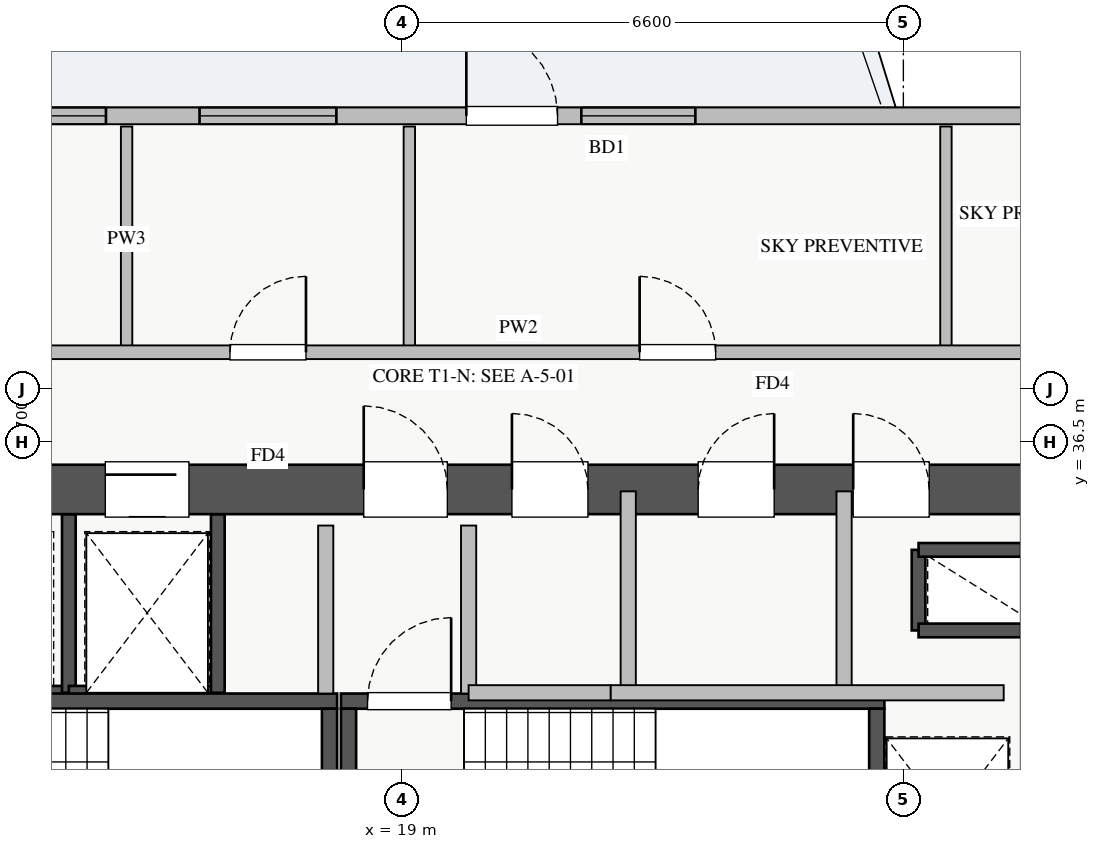
"""IFC4 building model, lengths in metres.
Left out: names, types, materials, properties, quantities, classifications, styles, units other than length and angle.
Written with IfcOpenShell. Run it as: python <this file> out.ifc"""

import sys

from ifc_helpers import new_model, si_unit, direction, frame, frame_2d, origin, place, context, subcontext, project, spatial, rectangle, extrude, source, transform, mapped, element, fill, save


model = new_model("IFC4")
c1 = context("Model", 3, precision=1e-05, world=origin(), true_north=direction((0.0, 1.0)))
c2 = subcontext(c1, "Body", "Model", "MODEL_VIEW")
j1 = project(units=[si_unit("LENGTHUNIT", "METRE"), si_unit("PLANEANGLEUNIT", "RADIAN")], contexts=[c1])
p1 = place(None, origin())
s1 = spatial("IfcSite", under=j1, at=p1, CompositionType="ELEMENT")
p2 = place(p1, origin())
s2 = spatial("IfcBuilding", under=s1, at=p2, CompositionType="ELEMENT")
p3 = place(p2, frame((0.0, 0.0, 179.5)))
s3 = spatial("IfcBuildingStorey", under=s2, at=p3, CompositionType="ELEMENT", Elevation=179.5)
p4 = place(p3, frame((12.68, 33.2, 0.0), z_axis=(0.0, 0.0, 1.0), x_axis=(1.0, 0.0, 0.0)))
e1 = element("IfcWall", 1, at=p4, inside=s3, PredefinedType="SHEAR", context=c2, shape_type="SweptSolid", body=[
    extrude(rectangle(XDim=1.94, YDim=0.18, at=frame_2d((0.97, 0.0))), origin(), (0.0, 0.0, 1.0), 3.07),
])
p5 = place(p3, frame((14.62, 33.2, 0.0), z_axis=(0.0, 0.0, 1.0), x_axis=(0.0, 1.0, 0.0)))
e2 = element("IfcWall", 2, at=p5, inside=s3, PredefinedType="SHEAR", context=c2, shape_type="SweptSolid", body=[
    extrude(rectangle(XDim=2.35, YDim=0.18, at=frame_2d((1.175, 0.0))), origin(), (0.0, 0.0, 1.0), 3.07),
])
p6 = place(p3, frame((25.8, 34.02, 0.0), z_axis=(0.0, 0.0, 1.0), x_axis=(0.0, 1.0, 0.0)))
e3 = element("IfcWall", 3, at=p6, inside=s3, PredefinedType="SHEAR", context=c2, shape_type="SweptSolid", body=[
    extrude(rectangle(XDim=1.06, YDim=0.18, at=frame_2d((0.53, 0.0))), origin(), (0.0, 0.0, 1.0), 3.07),
])
for number, where, z_axis, x_axis in (
    (4, (25.8, 35.08, 0.0), (0.0, 0.0, 1.0), (1.0, 0.0, 0.0)),
    (5, (25.8, 34.02, 0.0), (0.0, 0.0, 1.0), (1.0, 0.0, 0.0)),
):
    element("IfcWall", number, at=place(p3, frame(where, z_axis=z_axis, x_axis=x_axis)), inside=s3, PredefinedType="SHEAR", context=c2, shape_type="SweptSolid", body=[
        extrude(rectangle(XDim=1.35, YDim=0.18, at=frame_2d((0.675, 0.0))), origin(), (0.0, 0.0, 1.0), 3.07),
    ])
p7 = place(p3, frame((14.62, 33.2, 0.0), z_axis=(0.0, 0.0, 1.0), x_axis=(1.0, 0.0, 0.0)))
e6 = element("IfcWall", 6, at=p7, inside=s3, PredefinedType="SHEAR", context=c2, shape_type="SweptSolid", body=[
    extrude(rectangle(XDim=1.96, YDim=0.18, at=frame_2d((0.98, 0.0))), origin(), (0.0, 0.0, 1.0), 3.07),
])
p8 = place(p3, frame((16.58, 33.2, 0.0), z_axis=(0.0, 0.0, 1.0), x_axis=(0.0, 1.0, 0.0)))
e7 = element("IfcWall", 7, at=p8, inside=s3, PredefinedType="SHEAR", context=c2, shape_type="SweptSolid", body=[
    extrude(rectangle(XDim=2.35, YDim=0.18, at=frame_2d((1.175, 0.0))), origin(), (0.0, 0.0, 1.0), 3.07),
])
p9 = place(p3, frame((10.85, 33.09, 0.0), z_axis=(0.0, 0.0, 1.0), x_axis=(1.0, 0.0, 0.0)))
e8 = element("IfcWall", 8, at=p9, inside=s3, PredefinedType="SHEAR", context=c2, shape_type="SweptSolid", body=[
    extrude(rectangle(XDim=7.3, YDim=0.2, at=frame_2d((3.65, 0.0))), origin(), (0.0, 0.0, 1.0), 3.25),
])
p10 = place(p9, frame((0.35, 0.0, 0.0)))
e9 = element("IfcOpeningElement", 9, at=p10, cuts=e8, PredefinedType="OPENING", context=c2, shape_type="SweptSolid", body=[
    extrude(rectangle(XDim=1.1, YDim=2.05, at=frame_2d((0.55, 1.025))), frame((0.0, 0.11, 0.0), z_axis=(0.0, -1.0, 0.0), x_axis=(1.0, 0.0, 0.0)), (0.0, 0.0, 1.0), 0.22),
])
p11 = place(p3, frame((18.05, 30.05, 0.0), z_axis=(0.0, 0.0, 1.0), x_axis=(0.0, 1.0, 0.0)))
e10 = element("IfcWall", 10, at=p11, inside=s3, PredefinedType="SHEAR", context=c2, shape_type="SweptSolid", body=[
    extrude(rectangle(XDim=2.94, YDim=0.2, at=frame_2d((1.47, 0.0))), origin(), (0.0, 0.0, 1.0), 3.25),
])
p12 = place(p3, frame((18.2, 33.09, 0.0), z_axis=(0.0, 0.0, 1.0), x_axis=(1.0, 0.0, 0.0)))
e11 = element("IfcWall", 11, at=p12, inside=s3, PredefinedType="SHEAR", context=c2, shape_type="SweptSolid", body=[
    extrude(rectangle(XDim=7.15, YDim=0.2, at=frame_2d((3.575, 0.0))), origin(), (0.0, 0.0, 1.0), 3.25),
])
p13 = place(p12, frame((0.35, 0.0, 0.0)))
e12 = element("IfcOpeningElement", 12, at=p13, cuts=e11, PredefinedType="OPENING", context=c2, shape_type="SweptSolid", body=[
    extrude(rectangle(XDim=1.1, YDim=2.05, at=frame_2d((0.55, 1.025))), frame((0.0, 0.11, 0.0), z_axis=(0.0, -1.0, 0.0), x_axis=(1.0, 0.0, 0.0)), (0.0, 0.0, 1.0), 0.22),
])
for number, where, z_axis, x_axis in (
    (13, (18.3, 30.05, 0.0), (0.0, 0.0, 1.0), (0.0, 1.0, 0.0)),
    (14, (25.25, 30.05, 0.0), (0.0, 0.0, 1.0), (0.0, 1.0, 0.0)),
):
    element("IfcWall", number, at=place(p3, frame(where, z_axis=z_axis, x_axis=x_axis)), inside=s3, PredefinedType="SHEAR", context=c2, shape_type="SweptSolid", body=[
        extrude(rectangle(XDim=2.94, YDim=0.2, at=frame_2d((1.47, 0.0))), origin(), (0.0, 0.0, 1.0), 3.25),
    ])
p14 = place(p3, frame((10.2, 35.875, 0.0), z_axis=(0.0, 0.0, 1.0), x_axis=(1.0, 0.0, 0.0)))
e15 = element("IfcWall", 15, at=p14, inside=s3, PredefinedType="SHEAR", context=c2, shape_type="SweptSolid", body=[
    extrude(rectangle(XDim=17.6, YDim=0.65, at=frame_2d((8.8, 0.0))), origin(), (0.0, 0.0, 1.0), 3.25),
])
p15 = place(p14, frame((1.15, 0.0, 0.0)))
e16 = element("IfcOpeningElement", 16, at=p15, cuts=e15, PredefinedType="OPENING", context=c2, shape_type="SweptSolid", body=[
    extrude(rectangle(XDim=1.1, YDim=2.05, at=frame_2d((0.55, 1.025))), frame((0.0, 0.335, 0.0), z_axis=(0.0, -1.0, 0.0), x_axis=(1.0, 0.0, 0.0)), (0.0, 0.0, 1.0), 0.67),
])
p16 = place(p14, frame((8.3, 0.0, 0.0)))
e17 = element("IfcOpeningElement", 17, at=p16, cuts=e15, PredefinedType="OPENING", context=c2, shape_type="SweptSolid", body=[
    extrude(rectangle(XDim=1.1, YDim=2.05, at=frame_2d((0.55, 1.025))), frame((0.0, 0.335, 0.0), z_axis=(0.0, -1.0, 0.0), x_axis=(1.0, 0.0, 0.0)), (0.0, 0.0, 1.0), 0.67),
])
p17 = place(p14, frame((4.9, 0.0, 0.0)))
e18 = element("IfcOpeningElement", 18, at=p17, cuts=e15, PredefinedType="OPENING", context=c2, shape_type="SweptSolid", body=[
    extrude(rectangle(XDim=1.1, YDim=2.05, at=frame_2d((0.55, 1.025))), frame((0.0, 0.335, 0.0), z_axis=(0.0, -1.0, 0.0), x_axis=(1.0, 0.0, 0.0)), (0.0, 0.0, 1.0), 0.67),
])
p18 = place(p14, frame((14.74, 0.0, 0.0)))
e19 = element("IfcOpeningElement", 19, at=p18, cuts=e15, PredefinedType="OPENING", context=c2, shape_type="SweptSolid", body=[
    extrude(rectangle(XDim=1.0, YDim=2.05, at=frame_2d((0.5, 1.025))), frame((0.0, 0.335, 0.0), z_axis=(0.0, -1.0, 0.0), x_axis=(1.0, 0.0, 0.0)), (0.0, 0.0, 1.0), 0.67),
])
p19 = place(p14, frame((10.25, 0.0, 0.0)))
e20 = element("IfcOpeningElement", 20, at=p19, cuts=e15, PredefinedType="OPENING", context=c2, shape_type="SweptSolid", body=[
    extrude(rectangle(XDim=1.0, YDim=2.05, at=frame_2d((0.5, 1.025))), frame((0.0, 0.335, 0.0), z_axis=(0.0, -1.0, 0.0), x_axis=(1.0, 0.0, 0.0)), (0.0, 0.0, 1.0), 0.67),
])
p20 = place(p14, frame((12.7, 0.0, 0.0)))
e21 = element("IfcOpeningElement", 21, at=p20, cuts=e15, PredefinedType="OPENING", context=c2, shape_type="SweptSolid", body=[
    extrude(rectangle(XDim=1.0, YDim=2.05, at=frame_2d((0.5, 1.025))), frame((0.0, 0.335, 0.0), z_axis=(0.0, -1.0, 0.0), x_axis=(1.0, 0.0, 0.0)), (0.0, 0.0, 1.0), 0.67),
])
p21 = place(p3, frame((6.55, 40.79, 0.0), z_axis=(0.0, 0.0, 1.0), x_axis=(1.0, 0.0, 0.0)))
e22 = element("IfcWall", 22, at=p21, inside=s3, PredefinedType="STANDARD", context=c2, shape_type="SweptSolid", body=[
    extrude(rectangle(XDim=24.9, YDim=0.22, at=frame_2d((12.45, 0.0))), origin(), (0.0, 0.0, 1.0), 2.61),
])
p22 = place(p21, frame((13.3, 0.0, 0.0)))
e23 = element("IfcOpeningElement", 23, at=p22, cuts=e22, PredefinedType="OPENING", context=c2, shape_type="SweptSolid", body=[
    extrude(rectangle(XDim=1.2, YDim=2.1, at=frame_2d((0.6, 1.05))), frame((0.0, 0.12, 0.0), z_axis=(0.0, -1.0, 0.0), x_axis=(1.0, 0.0, 0.0)), (0.0, 0.0, 1.0), 0.24),
])
p23 = place(p21, frame((0.343, 0.0, 0.9)))
e24 = element("IfcOpeningElement", 24, at=p23, cuts=e22, PredefinedType="OPENING", context=c2, shape_type="SweptSolid", body=[
    extrude(rectangle(XDim=1.5, YDim=1.5, at=frame_2d((0.75, 0.75))), frame((0.0, 0.12, 0.0), z_axis=(0.0, -1.0, 0.0), x_axis=(1.0, 0.0, 0.0)), (0.0, 0.0, 1.0), 0.24),
])
p24 = place(p21, frame((9.79, 0.0, 0.9)))
e25 = element("IfcOpeningElement", 25, at=p24, cuts=e22, PredefinedType="OPENING", context=c2, shape_type="SweptSolid", body=[
    extrude(rectangle(XDim=1.8, YDim=1.5, at=frame_2d((0.9, 0.75))), frame((0.0, 0.12, 0.0), z_axis=(0.0, -1.0, 0.0), x_axis=(1.0, 0.0, 0.0)), (0.0, 0.0, 1.0), 0.24),
])
p25 = place(p21, frame((14.813, 0.0, 0.9)))
e26 = element("IfcOpeningElement", 26, at=p25, cuts=e22, PredefinedType="OPENING", context=c2, shape_type="SweptSolid", body=[
    extrude(rectangle(XDim=1.5, YDim=1.45, at=frame_2d((0.75, 0.725))), frame((0.0, 0.12, 0.0), z_axis=(0.0, -1.0, 0.0), x_axis=(1.0, 0.0, 0.0)), (0.0, 0.0, 1.0), 0.24),
])
p26 = place(p21, frame((20.738, 0.0, 0.9)))
e27 = element("IfcOpeningElement", 27, at=p26, cuts=e22, PredefinedType="OPENING", context=c2, shape_type="SweptSolid", body=[
    extrude(rectangle(XDim=2.1, YDim=1.48, at=frame_2d((1.05, 0.74))), frame((0.0, 0.12, 0.0), z_axis=(0.0, -1.0, 0.0), x_axis=(1.0, 0.0, 0.0)), (0.0, 0.0, 1.0), 0.24),
])
p27 = place(p21, frame((4.122, 0.0, 0.9)))
e28 = element("IfcOpeningElement", 28, at=p27, cuts=e22, PredefinedType="OPENING", context=c2, shape_type="SweptSolid", body=[
    extrude(rectangle(XDim=2.4, YDim=1.5, at=frame_2d((1.2, 0.75))), frame((0.0, 0.12, 0.0), z_axis=(0.0, -1.0, 0.0), x_axis=(1.0, 0.0, 0.0)), (0.0, 0.0, 1.0), 0.24),
])
p28 = place(p21, frame((6.758, 0.0, 0.9)))
e29 = element("IfcOpeningElement", 29, at=p28, cuts=e22, PredefinedType="OPENING", context=c2, shape_type="SweptSolid", body=[
    extrude(rectangle(XDim=1.8, YDim=1.5, at=frame_2d((0.9, 0.75))), frame((0.0, 0.12, 0.0), z_axis=(0.0, -1.0, 0.0), x_axis=(1.0, 0.0, 0.0)), (0.0, 0.0, 1.0), 0.24),
])
for number, where, z_axis, x_axis in (
    (30, (18.0, 33.19, 0.0), (0.0, 0.0, 1.0), (0.0, 1.0, 0.0)),
    (31, (19.88, 33.19, 0.0), (0.0, 0.0, 1.0), (0.0, 1.0, 0.0)),
):
    element("IfcWall", number, at=place(p3, frame(where, z_axis=z_axis, x_axis=x_axis)), inside=s3, PredefinedType="PARTITIONING", context=c2, shape_type="SweptSolid", body=[
        extrude(rectangle(XDim=2.21, YDim=0.2, at=frame_2d((1.105, 0.0))), origin(), (0.0, 0.0, 1.0), 3.07),
    ])
p29 = place(p3, frame((24.82, 33.2, 0.0), z_axis=(0.0, 0.0, 1.0), x_axis=(0.0, 1.0, 0.0)))
e32 = element("IfcWall", 32, at=p29, inside=s3, PredefinedType="PARTITIONING", context=c2, shape_type="SweptSolid", body=[
    extrude(rectangle(XDim=2.65, YDim=0.2, at=frame_2d((1.325, 0.0))), origin(), (0.0, 0.0, 1.0), 3.07),
])
p30 = place(p3, frame((19.88, 33.2, 0.0), z_axis=(0.0, 0.0, 1.0), x_axis=(1.0, 0.0, 0.0)))
e33 = element("IfcWall", 33, at=p30, inside=s3, PredefinedType="PARTITIONING", context=c2, shape_type="SweptSolid", body=[
    extrude(rectangle(XDim=1.87, YDim=0.2, at=frame_2d((0.935, 0.0))), origin(), (0.0, 0.0, 1.0), 3.07),
])
p31 = place(p3, frame((21.98, 33.2, 0.0), z_axis=(0.0, 0.0, 1.0), x_axis=(0.0, 1.0, 0.0)))
e34 = element("IfcWall", 34, at=p31, inside=s3, PredefinedType="PARTITIONING", context=c2, shape_type="SweptSolid", body=[
    extrude(rectangle(XDim=2.65, YDim=0.2, at=frame_2d((1.325, 0.0))), origin(), (0.0, 0.0, 1.0), 3.07),
])
p32 = place(p3, frame((21.75, 33.2, 0.0), z_axis=(0.0, 0.0, 1.0), x_axis=(1.0, 0.0, 0.0)))
e35 = element("IfcWall", 35, at=p32, inside=s3, PredefinedType="PARTITIONING", context=c2, shape_type="SweptSolid", body=[
    extrude(rectangle(XDim=5.17, YDim=0.2, at=frame_2d((2.585, 0.0))), origin(), (0.0, 0.0, 1.0), 3.07),
])
p33 = place(p3, frame((15.38, 37.68, 0.0), z_axis=(0.0, 0.0, 1.0), x_axis=(0.0, 1.0, 0.0)))
e36 = element("IfcWall", 36, at=p33, inside=s3, PredefinedType="PARTITIONING", context=c2, shape_type="SweptSolid", body=[
    extrude(rectangle(XDim=2.97, YDim=0.15, at=frame_2d((1.485, 0.0))), origin(), (0.0, 0.0, 1.0), 3.07),
])
p34 = place(p3, frame((19.1, 37.68, 0.0), z_axis=(0.0, 0.0, 1.0), x_axis=(0.0, 1.0, 0.0)))
e37 = element("IfcWall", 37, at=p34, inside=s3, PredefinedType="PARTITIONING", context=c2, shape_type="SweptSolid", body=[
    extrude(rectangle(XDim=2.97, YDim=0.15, at=frame_2d((1.485, 0.0))), origin(), (0.0, 0.0, 1.0), 2.821),
])
p35 = place(p3, frame((26.16, 37.68, 0.0), z_axis=(0.0, 0.0, 1.0), x_axis=(0.0, 1.0, 0.0)))
e38 = element("IfcWall", 38, at=p35, inside=s3, PredefinedType="PARTITIONING", context=c2, shape_type="SweptSolid", body=[
    extrude(rectangle(XDim=2.97, YDim=0.15, at=frame_2d((1.485, 0.0))), origin(), (0.0, 0.0, 1.0), 3.07),
])
p36 = place(p3, frame((8.72, 37.68, 0.0), z_axis=(0.0, 0.0, 1.0), x_axis=(1.0, 0.0, 0.0)))
e39 = element("IfcWall", 39, at=p36, inside=s3, PredefinedType="PARTITIONING", context=c2, shape_type="SweptSolid", body=[
    extrude(rectangle(XDim=23.63, YDim=0.18, at=frame_2d((11.815, 0.0))), origin(), (0.0, 0.0, 1.0), 3.07),
])
p37 = place(p36, frame((2.83, 0.0, 0.0)))
e40 = element("IfcOpeningElement", 40, at=p37, cuts=e39, PredefinedType="OPENING", context=c2, shape_type="SweptSolid", body=[
    extrude(rectangle(XDim=1.0, YDim=2.05, at=frame_2d((0.5, 1.025))), frame((0.0, 0.1, 0.0), z_axis=(0.0, -1.0, 0.0), x_axis=(1.0, 0.0, 0.0)), (0.0, 0.0, 1.0), 0.2),
])
p38 = place(p36, frame((8.02, 0.0, 0.0)))
e41 = element("IfcOpeningElement", 41, at=p38, cuts=e39, PredefinedType="OPENING", context=c2, shape_type="SweptSolid", body=[
    extrude(rectangle(XDim=1.0, YDim=2.05, at=frame_2d((0.5, 1.025))), frame((0.0, 0.1, 0.0), z_axis=(0.0, -1.0, 0.0), x_axis=(1.0, 0.0, 0.0)), (0.0, 0.0, 1.0), 0.2),
])
p39 = place(p36, frame((13.41, 0.0, 0.0)))
e42 = element("IfcOpeningElement", 42, at=p39, cuts=e39, PredefinedType="OPENING", context=c2, shape_type="SweptSolid", body=[
    extrude(rectangle(XDim=1.0, YDim=2.05, at=frame_2d((0.5, 1.025))), frame((0.0, 0.1, 0.0), z_axis=(0.0, -1.0, 0.0), x_axis=(1.0, 0.0, 0.0)), (0.0, 0.0, 1.0), 0.2),
])
p40 = place(p36, frame((19.85, 0.0, 0.0)))
e43 = element("IfcOpeningElement", 43, at=p40, cuts=e39, PredefinedType="OPENING", context=c2, shape_type="SweptSolid", body=[
    extrude(rectangle(XDim=1.0, YDim=2.05, at=frame_2d((0.5, 1.025))), frame((0.0, 0.1, 0.0), z_axis=(0.0, -1.0, 0.0), x_axis=(1.0, 0.0, 0.0)), (0.0, 0.0, 1.0), 0.2),
])
m1 = source(origin(), c2, "Body", "SweptSolid", [
    extrude(rectangle(XDim=1.2, YDim=2.1, at=frame_2d((0.6, 1.05))), frame((0.0, 0.025, 0.0), z_axis=(0.0, -1.0, 0.0), x_axis=(1.0, 0.0, 0.0)), (0.0, 0.0, 1.0), 0.05),
])
p41 = place(p22, origin())
e44 = element("IfcDoor", 44, at=p41, inside=s3, OperationType="SINGLE_SWING_LEFT", PredefinedType="DOOR", context=c2, shape_type="MappedRepresentation", body=[
    mapped(m1, transform((0.0, 0.0, 0.0), x_axis=(1.0, 0.0, 0.0), y_axis=(0.0, 1.0, 0.0), z_axis=(0.0, 0.0, 1.0), scale=1.0)),
])
fill(e23, e44)
m2 = source(origin(), c2, "Body", "SweptSolid", [
    extrude(rectangle(XDim=1.8, YDim=1.5, at=frame_2d((0.9, 0.75))), frame((0.0, 0.03, 0.0), z_axis=(0.0, -1.0, 0.0), x_axis=(1.0, 0.0, 0.0)), (0.0, 0.0, 1.0), 0.06),
])
p42 = place(p24, origin())
e45 = element("IfcWindow", 45, at=p42, inside=s3, PartitioningType="DOUBLE_PANEL_VERTICAL", PredefinedType="WINDOW", context=c2, shape_type="MappedRepresentation", body=[
    mapped(m2, transform((0.0, 0.0, 0.0), x_axis=(1.0, 0.0, 0.0), y_axis=(0.0, 1.0, 0.0), z_axis=(0.0, 0.0, 1.0), scale=1.0)),
])
fill(e25, e45)
m3 = source(origin(), c2, "Body", "SweptSolid", [
    extrude(rectangle(XDim=1.5, YDim=1.45, at=frame_2d((0.75, 0.725))), frame((0.0, 0.03, 0.0), z_axis=(0.0, -1.0, 0.0), x_axis=(1.0, 0.0, 0.0)), (0.0, 0.0, 1.0), 0.06),
])
p43 = place(p25, origin())
e46 = element("IfcWindow", 46, at=p43, inside=s3, PartitioningType="DOUBLE_PANEL_VERTICAL", PredefinedType="WINDOW", context=c2, shape_type="MappedRepresentation", body=[
    mapped(m3, transform((0.0, 0.0, 0.0), x_axis=(1.0, 0.0, 0.0), y_axis=(0.0, 1.0, 0.0), z_axis=(0.0, 0.0, 1.0), scale=1.0)),
])
fill(e26, e46)
m4 = source(origin(), c2, "Body", "SweptSolid", [
    extrude(rectangle(XDim=1.1, YDim=2.05, at=frame_2d((0.55, 1.025))), frame((0.0, 0.025, 0.0), z_axis=(0.0, -1.0, 0.0), x_axis=(1.0, 0.0, 0.0)), (0.0, 0.0, 1.0), 0.05),
])
p44 = place(p16, origin())
e47 = element("IfcDoor", 47, at=p44, inside=s3, OperationType="SINGLE_SWING_LEFT", PredefinedType="DOOR", context=c2, shape_type="MappedRepresentation", body=[
    mapped(m4, transform((0.0, 0.0, 0.0), x_axis=(1.0, 0.0, 0.0), y_axis=(0.0, 1.0, 0.0), z_axis=(0.0, 0.0, 1.0), scale=1.0)),
])
fill(e17, e47)
p45 = place(p13, origin())
e48 = element("IfcDoor", 48, at=p45, inside=s3, OperationType="SINGLE_SWING_RIGHT", PredefinedType="DOOR", context=c2, shape_type="MappedRepresentation", body=[
    mapped(m4, transform((0.0, 0.0, 0.0), x_axis=(1.0, 0.0, 0.0), y_axis=(0.0, 1.0, 0.0), z_axis=(0.0, 0.0, 1.0), scale=1.0)),
])
fill(e12, e48)
p46 = place(p17, origin())
e49 = element("IfcDoor", 49, at=p46, inside=s3, OperationType="SLIDING_TO_LEFT", PredefinedType="DOOR", context=c2, shape_type="MappedRepresentation", body=[
    mapped(m4, transform((0.0, 0.0, 0.0), x_axis=(1.0, 0.0, 0.0), y_axis=(0.0, 1.0, 0.0), z_axis=(0.0, 0.0, 1.0), scale=1.0)),
])
fill(e18, e49)
m5 = source(origin(), c2, "Body", "SweptSolid", [
    extrude(rectangle(XDim=1.0, YDim=2.05, at=frame_2d((0.5, 1.025))), frame((0.0, 0.025, 0.0), z_axis=(0.0, -1.0, 0.0), x_axis=(1.0, 0.0, 0.0)), (0.0, 0.0, 1.0), 0.05),
])
p47 = place(p18, origin())
e50 = element("IfcDoor", 50, at=p47, inside=s3, OperationType="SINGLE_SWING_LEFT", PredefinedType="DOOR", context=c2, shape_type="MappedRepresentation", body=[
    mapped(m5, transform((0.0, 0.0, 0.0), x_axis=(1.0, 0.0, 0.0), y_axis=(0.0, 1.0, 0.0), z_axis=(0.0, 0.0, 1.0), scale=1.0)),
])
fill(e19, e50)
p48 = place(p19, origin())
e51 = element("IfcDoor", 51, at=p48, inside=s3, OperationType="SINGLE_SWING_LEFT", PredefinedType="DOOR", context=c2, shape_type="MappedRepresentation", body=[
    mapped(m5, transform((0.0, 0.0, 0.0), x_axis=(1.0, 0.0, 0.0), y_axis=(0.0, 1.0, 0.0), z_axis=(0.0, 0.0, 1.0), scale=1.0)),
])
fill(e20, e51)
p49 = place(p20, origin())
e52 = element("IfcDoor", 52, at=p49, inside=s3, OperationType="SINGLE_SWING_RIGHT", PredefinedType="DOOR", context=c2, shape_type="MappedRepresentation", body=[
    mapped(m5, transform((0.0, 0.0, 0.0), x_axis=(1.0, 0.0, 0.0), y_axis=(0.0, 1.0, 0.0), z_axis=(0.0, 0.0, 1.0), scale=1.0)),
])
fill(e21, e52)
p50 = place(p38, origin())
e53 = element("IfcDoor", 53, at=p50, inside=s3, OperationType="SINGLE_SWING_RIGHT", PredefinedType="DOOR", context=c2, shape_type="MappedRepresentation", body=[
    mapped(m5, transform((0.0, 0.0, 0.0), x_axis=(1.0, 0.0, 0.0), y_axis=(0.0, 1.0, 0.0), z_axis=(0.0, 0.0, 1.0), scale=1.0)),
])
fill(e41, e53)
p51 = place(p39, origin())
e54 = element("IfcDoor", 54, at=p51, inside=s3, OperationType="SINGLE_SWING_LEFT", PredefinedType="DOOR", context=c2, shape_type="MappedRepresentation", body=[
    mapped(m5, transform((0.0, 0.0, 0.0), x_axis=(1.0, 0.0, 0.0), y_axis=(0.0, 1.0, 0.0), z_axis=(0.0, 0.0, 1.0), scale=1.0)),
])
fill(e42, e54)
p52 = place(p28, origin())
e55 = element("IfcWindow", 55, at=p52, inside=s3, PartitioningType="DOUBLE_PANEL_VERTICAL", PredefinedType="WINDOW", context=c2, shape_type="MappedRepresentation", body=[
    mapped(m2, transform((0.0, 0.0, 0.0), x_axis=(1.0, 0.0, 0.0), y_axis=(0.0, 1.0, 0.0), z_axis=(0.0, 0.0, 1.0), scale=1.0)),
])
fill(e29, e55)
save(model, sys.argv[1])
